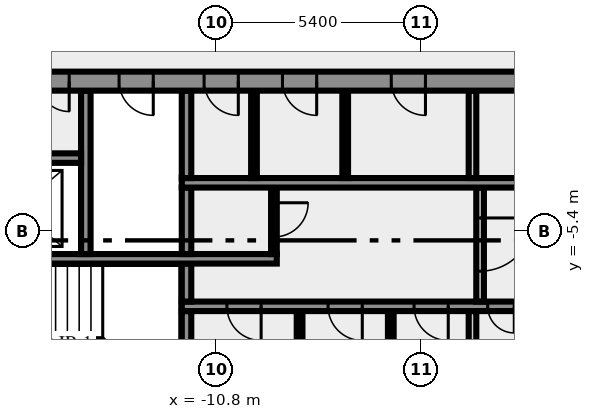
"""IFC4 building model, lengths in metres.
Left out: names, types, materials, properties, quantities, classifications, styles, units other than length and angle.
Written with IfcOpenShell. Run it as: python <this file> out.ifc"""

import sys

from ifc_helpers import new_model, si_unit, direction, frame, frame_2d, origin, place, context, subcontext, project, spatial, rectangle, extrude, element, fill, save


model = new_model("IFC4")
c1 = context("Model", 3, precision=1e-05, world=origin(), true_north=direction((0.0, 1.0)))
c2 = subcontext(c1, "Body", "Model", "MODEL_VIEW")
j1 = project(units=[si_unit("LENGTHUNIT", "METRE"), si_unit("PLANEANGLEUNIT", "RADIAN")], contexts=[c1])
p1 = place(None, origin())
s1 = spatial("IfcSite", under=j1, at=p1, CompositionType="ELEMENT")
p2 = place(p1, origin())
s2 = spatial("IfcBuilding", under=s1, at=p2, CompositionType="ELEMENT")
p3 = place(p2, frame((0.0, 0.0, 214.0)))
s3 = spatial("IfcBuildingStorey", under=s2, at=p3, CompositionType="ELEMENT", Elevation=214.0)
p4 = place(p3, frame((-11.575, -10.5, 0.0), z_axis=(0.0, 0.0, 1.0), x_axis=(0.0, 1.0, 0.0)))
e1 = element("IfcWall", 1, at=p4, inside=s3, PredefinedType="SHEAR", context=c2, shape_type="SweptSolid", body=[
    extrude(rectangle(XDim=3.0, YDim=0.25, at=frame_2d((1.5, 0.0))), origin(), (0.0, 0.0, 1.0), 3.65),
])
for number, where, z_axis, x_axis in (
    (2, (-8.6, -10.5, 0.0), (0.0, 0.0, 1.0), (0.0, 1.0, 0.0)),
    (3, (-6.2, -10.5, 0.0), (0.0, 0.0, 1.0), (0.0, 1.0, 0.0)),
):
    element("IfcWall", number, at=place(p3, frame(where, z_axis=z_axis, x_axis=x_axis)), inside=s3, PredefinedType="PARTITIONING", context=c2, shape_type="SweptSolid", body=[
        extrude(rectangle(XDim=3.0, YDim=0.15, at=frame_2d((1.5, 0.0))), origin(), (0.0, 0.0, 1.0), 3.65),
    ])
p5 = place(p3, frame((-4.05, -10.5, 0.0), z_axis=(0.0, 0.0, 1.0), x_axis=(0.0, 1.0, 0.0)))
e4 = element("IfcWall", 4, at=p5, inside=s3, PredefinedType="SOLIDWALL", context=c2, shape_type="SweptSolid", body=[
    extrude(rectangle(XDim=3.0, YDim=0.2, at=frame_2d((1.5, 0.0))), origin(), (0.0, 0.0, 1.0), 3.65),
])
p6 = place(p3, frame((11.7, -7.375, 0.0), z_axis=(0.0, 0.0, 1.0), x_axis=(-1.0, 0.0, 0.0)))
e5 = element("IfcWall", 5, at=p6, inside=s3, PredefinedType="SHEAR", context=c2, shape_type="SweptSolid", body=[
    extrude(rectangle(XDim=23.4, YDim=0.25, at=frame_2d((11.7, 0.0))), origin(), (0.0, 0.0, 1.0), 3.65),
])
p7 = place(p6, frame((21.312, 0.0, 0.0)))
e6 = element("IfcOpeningElement", 6, at=p7, cuts=e5, PredefinedType="OPENING", context=c2, shape_type="SweptSolid", body=[
    extrude(rectangle(XDim=0.9, YDim=2.1, at=frame_2d((0.45, 1.05))), frame((0.0, 0.135, 0.0), z_axis=(0.0, -1.0, 0.0), x_axis=(1.0, 0.0, 0.0)), (0.0, 0.0, 1.0), 0.27),
])
p8 = place(p6, frame((18.65, 0.0, 0.0)))
e7 = element("IfcOpeningElement", 7, at=p8, cuts=e5, PredefinedType="OPENING", context=c2, shape_type="SweptSolid", body=[
    extrude(rectangle(XDim=0.9, YDim=2.1, at=frame_2d((0.45, 1.05))), frame((0.0, 0.135, 0.0), z_axis=(0.0, -1.0, 0.0), x_axis=(1.0, 0.0, 0.0)), (0.0, 0.0, 1.0), 0.27),
])
p9 = place(p6, frame((16.388, 0.0, 0.0)))
e8 = element("IfcOpeningElement", 8, at=p9, cuts=e5, PredefinedType="OPENING", context=c2, shape_type="SweptSolid", body=[
    extrude(rectangle(XDim=0.9, YDim=2.1, at=frame_2d((0.45, 1.05))), frame((0.0, 0.135, 0.0), z_axis=(0.0, -1.0, 0.0), x_axis=(1.0, 0.0, 0.0)), (0.0, 0.0, 1.0), 0.27),
])
p10 = place(p6, frame((14.65, 0.0, 0.0)))
e9 = element("IfcOpeningElement", 9, at=p10, cuts=e5, PredefinedType="OPENING", context=c2, shape_type="SweptSolid", body=[
    extrude(rectangle(XDim=0.7, YDim=2.1, at=frame_2d((0.35, 1.05))), frame((0.0, 0.135, 0.0), z_axis=(0.0, -1.0, 0.0), x_axis=(1.0, 0.0, 0.0)), (0.0, 0.0, 1.0), 0.27),
])
p11 = place(p6, frame((13.35, 0.0, 0.0)))
e10 = element("IfcOpeningElement", 10, at=p11, cuts=e5, PredefinedType="OPENING", context=c2, shape_type="SweptSolid", body=[
    extrude(rectangle(XDim=0.9, YDim=2.1, at=frame_2d((0.45, 1.05))), frame((0.0, 0.135, 0.0), z_axis=(0.0, -1.0, 0.0), x_axis=(1.0, 0.0, 0.0)), (0.0, 0.0, 1.0), 0.27),
])
p12 = place(p6, frame((11.975, 0.0, 0.0)))
e11 = element("IfcOpeningElement", 11, at=p12, cuts=e5, PredefinedType="OPENING", context=c2, shape_type="SweptSolid", body=[
    extrude(rectangle(XDim=0.9, YDim=2.1, at=frame_2d((0.45, 1.05))), frame((0.0, 0.135, 0.0), z_axis=(0.0, -1.0, 0.0), x_axis=(1.0, 0.0, 0.0)), (0.0, 0.0, 1.0), 0.27),
])
p13 = place(p6, frame((10.5, 0.0, 0.0)))
e12 = element("IfcOpeningElement", 12, at=p13, cuts=e5, PredefinedType="OPENING", context=c2, shape_type="SweptSolid", body=[
    extrude(rectangle(XDim=0.9, YDim=2.1, at=frame_2d((0.45, 1.05))), frame((0.0, 0.135, 0.0), z_axis=(0.0, -1.0, 0.0), x_axis=(1.0, 0.0, 0.0)), (0.0, 0.0, 1.0), 0.27),
])
p14 = place(p6, frame((8.35, 0.0, 0.0)))
e13 = element("IfcOpeningElement", 13, at=p14, cuts=e5, PredefinedType="OPENING", context=c2, shape_type="SweptSolid", body=[
    extrude(rectangle(XDim=1.1, YDim=2.1, at=frame_2d((0.55, 1.05))), frame((0.0, 0.135, 0.0), z_axis=(0.0, -1.0, 0.0), x_axis=(1.0, 0.0, 0.0)), (0.0, 0.0, 1.0), 0.27),
])
p15 = place(p6, frame((5.85, 0.0, 0.0)))
e14 = element("IfcOpeningElement", 14, at=p15, cuts=e5, PredefinedType="OPENING", context=c2, shape_type="SweptSolid", body=[
    extrude(rectangle(XDim=1.1, YDim=2.1, at=frame_2d((0.55, 1.05))), frame((0.0, 0.135, 0.0), z_axis=(0.0, -1.0, 0.0), x_axis=(1.0, 0.0, 0.0)), (0.0, 0.0, 1.0), 0.27),
])
p16 = place(p6, frame((3.35, 0.0, 0.0)))
e15 = element("IfcOpeningElement", 15, at=p16, cuts=e5, PredefinedType="OPENING", context=c2, shape_type="SweptSolid", body=[
    extrude(rectangle(XDim=1.1, YDim=2.1, at=frame_2d((0.55, 1.05))), frame((0.0, 0.135, 0.0), z_axis=(0.0, -1.0, 0.0), x_axis=(1.0, 0.0, 0.0)), (0.0, 0.0, 1.0), 0.27),
])
p17 = place(p6, frame((0.85, 0.0, 0.0)))
e16 = element("IfcOpeningElement", 16, at=p17, cuts=e5, PredefinedType="OPENING", context=c2, shape_type="SweptSolid", body=[
    extrude(rectangle(XDim=1.1, YDim=2.1, at=frame_2d((0.55, 1.05))), frame((0.0, 0.135, 0.0), z_axis=(0.0, -1.0, 0.0), x_axis=(1.0, 0.0, 0.0)), (0.0, 0.0, 1.0), 0.27),
])
p18 = place(p3, frame((-11.575, -7.25, 0.0), z_axis=(0.0, 0.0, 1.0), x_axis=(0.0, 1.0, 0.0)))
e17 = element("IfcWall", 17, at=p18, inside=s3, PredefinedType="SHEAR", context=c2, shape_type="SweptSolid", body=[
    extrude(rectangle(XDim=1.0, YDim=0.25, at=frame_2d((0.5, 0.0))), origin(), (0.0, 0.0, 1.0), 3.65),
])
p19 = place(p3, frame((-3.85, -4.25, 0.0), z_axis=(0.0, 0.0, 1.0), x_axis=(0.0, -1.0, 0.0)))
e18 = element("IfcWall", 18, at=p19, inside=s3, PredefinedType="SOLIDWALL", context=c2, shape_type="SweptSolid", body=[
    extrude(rectangle(XDim=3.0, YDim=0.2, at=frame_2d((1.5, 0.0))), origin(), (0.0, 0.0, 1.0), 3.65),
])
p20 = place(p19, frame((0.8, 0.0, 0.0)))
e19 = element("IfcOpeningElement", 19, at=p20, cuts=e18, PredefinedType="OPENING", context=c2, shape_type="SweptSolid", body=[
    extrude(rectangle(XDim=1.4, YDim=2.1, at=frame_2d((0.7, 1.05))), frame((0.0, 0.11, 0.0), z_axis=(0.0, -1.0, 0.0), x_axis=(1.0, 0.0, 0.0)), (0.0, 0.0, 1.0), 0.22),
])
p21 = place(p3, frame((-9.2, -6.125, 0.0), z_axis=(0.0, 0.0, 1.0), x_axis=(-1.0, 0.0, 0.0)))
e20 = element("IfcWall", 20, at=p21, inside=s3, PredefinedType="SHEAR", context=c2, shape_type="SweptSolid", body=[
    extrude(rectangle(XDim=10.8, YDim=0.25, at=frame_2d((5.4, 0.0))), origin(), (0.0, 0.0, 1.0), 3.65),
])
p22 = place(p21, frame((8.45, 0.0, 0.0)))
e21 = element("IfcOpeningElement", 21, at=p22, cuts=e20, PredefinedType="OPENING", context=c2, shape_type="SweptSolid", body=[
    extrude(rectangle(XDim=1.8, YDim=2.1, at=frame_2d((0.9, 1.05))), frame((0.0, 0.135, 0.0), z_axis=(0.0, -1.0, 0.0), x_axis=(1.0, 0.0, 0.0)), (0.0, 0.0, 1.0), 0.27),
])
p23 = place(p3, frame((-14.225, -6.0, 0.0), z_axis=(0.0, 0.0, 1.0), x_axis=(0.0, 1.0, 0.0)))
e22 = element("IfcWall", 22, at=p23, inside=s3, PredefinedType="SHEAR", context=c2, shape_type="SweptSolid", body=[
    extrude(rectangle(XDim=4.3, YDim=0.25, at=frame_2d((2.15, 0.0))), origin(), (0.0, 0.0, 1.0), 3.65),
])
p24 = place(p3, frame((-11.575, -6.0, 0.0), z_axis=(0.0, 0.0, 1.0), x_axis=(0.0, 1.0, 0.0)))
e23 = element("IfcWall", 23, at=p24, inside=s3, PredefinedType="SHEAR", context=c2, shape_type="SweptSolid", body=[
    extrude(rectangle(XDim=1.75, YDim=0.25, at=frame_2d((0.875, 0.0))), origin(), (0.0, 0.0, 1.0), 3.65),
])
p25 = place(p3, frame((-9.275, -4.25, 0.0), z_axis=(0.0, 0.0, 1.0), x_axis=(0.0, -1.0, 0.0)))
e24 = element("IfcWall", 24, at=p25, inside=s3, PredefinedType="PARTITIONING", context=c2, shape_type="SweptSolid", body=[
    extrude(rectangle(XDim=1.75, YDim=0.15, at=frame_2d((0.875, 0.0))), origin(), (0.0, 0.0, 1.0), 3.65),
])
p26 = place(p25, frame((0.4, 0.0, 0.0)))
e25 = element("IfcOpeningElement", 25, at=p26, cuts=e24, PredefinedType="OPENING", context=c2, shape_type="SweptSolid", body=[
    extrude(rectangle(XDim=0.9, YDim=2.1, at=frame_2d((0.45, 1.05))), frame((0.0, 0.085, 0.0), z_axis=(0.0, -1.0, 0.0), x_axis=(1.0, 0.0, 0.0)), (0.0, 0.0, 1.0), 0.17),
])
p27 = place(p3, frame((-11.7, -4.125, 0.0), z_axis=(0.0, 0.0, 1.0), x_axis=(1.0, 0.0, 0.0)))
e26 = element("IfcWall", 26, at=p27, inside=s3, PredefinedType="SHEAR", context=c2, shape_type="SweptSolid", body=[
    extrude(rectangle(XDim=10.05, YDim=0.25, at=frame_2d((5.025, 0.0))), origin(), (0.0, 0.0, 1.0), 3.65),
])
p28 = place(p3, frame((-11.575, -4.0, 0.0), z_axis=(0.0, 0.0, 1.0), x_axis=(0.0, 1.0, 0.0)))
e27 = element("IfcWall", 27, at=p28, inside=s3, PredefinedType="SHEAR", context=c2, shape_type="SweptSolid", body=[
    extrude(rectangle(XDim=2.3, YDim=0.25, at=frame_2d((1.15, 0.0))), origin(), (0.0, 0.0, 1.0), 3.65),
])
for number, where, z_axis, x_axis in (
    (28, (-9.8, -4.0, 0.0), (0.0, 0.0, 1.0), (0.0, 1.0, 0.0)),
    (29, (-7.4, -4.0, 0.0), (0.0, 0.0, 1.0), (0.0, 1.0, 0.0)),
):
    element("IfcWall", number, at=place(p3, frame(where, z_axis=z_axis, x_axis=x_axis)), inside=s3, PredefinedType="PARTITIONING", context=c2, shape_type="SweptSolid", body=[
        extrude(rectangle(XDim=2.3, YDim=0.15, at=frame_2d((1.15, 0.0))), origin(), (0.0, 0.0, 1.0), 3.65),
    ])
p29 = place(p3, frame((-4.05, -4.0, 0.0), z_axis=(0.0, 0.0, 1.0), x_axis=(0.0, 1.0, 0.0)))
e30 = element("IfcWall", 30, at=p29, inside=s3, PredefinedType="SOLIDWALL", context=c2, shape_type="SweptSolid", body=[
    extrude(rectangle(XDim=2.3, YDim=0.2, at=frame_2d((1.15, 0.0))), origin(), (0.0, 0.0, 1.0), 3.65),
])
p30 = place(p3, frame((-17.35, -3.475, 0.0), z_axis=(0.0, 0.0, 1.0), x_axis=(1.0, 0.0, 0.0)))
e31 = element("IfcWall", 31, at=p30, inside=s3, PredefinedType="SHEAR", context=c2, shape_type="SweptSolid", body=[
    extrude(rectangle(XDim=3.0, YDim=0.25, at=frame_2d((1.5, 0.0))), origin(), (0.0, 0.0, 1.0), 3.65),
])
p31 = place(p3, frame((20.49, -1.45, 0.0), z_axis=(0.0, 0.0, 1.0), x_axis=(-1.0, 0.0, 0.0)))
e32 = element("IfcWall", 32, at=p31, inside=s3, PredefinedType="SHEAR", context=c2, shape_type="SweptSolid", body=[
    extrude(rectangle(XDim=40.98, YDim=0.5, at=frame_2d((20.49, 0.0))), origin(), (0.0, 0.0, 1.0), 3.65),
])
p32 = place(p31, frame((38.14, 0.0, 0.0)))
e33 = element("IfcOpeningElement", 33, at=p32, cuts=e32, PredefinedType="OPENING", context=c2, shape_type="SweptSolid", body=[
    extrude(rectangle(XDim=1.8, YDim=2.1, at=frame_2d((0.9, 1.05))), frame((0.0, 0.26, 0.0), z_axis=(0.0, -1.0, 0.0), x_axis=(1.0, 0.0, 0.0)), (0.0, 0.0, 1.0), 0.52),
])
p33 = place(p31, frame((36.728, 0.0, 0.0)))
e34 = element("IfcOpeningElement", 34, at=p33, cuts=e32, PredefinedType="OPENING", context=c2, shape_type="SweptSolid", body=[
    extrude(rectangle(XDim=0.8, YDim=2.1, at=frame_2d((0.4, 1.05))), frame((0.0, 0.26, 0.0), z_axis=(0.0, -1.0, 0.0), x_axis=(1.0, 0.0, 0.0)), (0.0, 0.0, 1.0), 0.52),
])
p34 = place(p31, frame((35.153, 0.0, 0.0)))
e35 = element("IfcOpeningElement", 35, at=p34, cuts=e32, PredefinedType="OPENING", context=c2, shape_type="SweptSolid", body=[
    extrude(rectangle(XDim=0.8, YDim=2.1, at=frame_2d((0.4, 1.05))), frame((0.0, 0.26, 0.0), z_axis=(0.0, -1.0, 0.0), x_axis=(1.0, 0.0, 0.0)), (0.0, 0.0, 1.0), 0.52),
])
p35 = place(p31, frame((32.94, 0.0, 0.0)))
e36 = element("IfcOpeningElement", 36, at=p35, cuts=e32, PredefinedType="OPENING", context=c2, shape_type="SweptSolid", body=[
    extrude(rectangle(XDim=0.9, YDim=2.1, at=frame_2d((0.45, 1.05))), frame((0.0, 0.26, 0.0), z_axis=(0.0, -1.0, 0.0), x_axis=(1.0, 0.0, 0.0)), (0.0, 0.0, 1.0), 0.52),
])
p36 = place(p31, frame((30.702, 0.0, 0.0)))
e37 = element("IfcOpeningElement", 37, at=p36, cuts=e32, PredefinedType="OPENING", context=c2, shape_type="SweptSolid", body=[
    extrude(rectangle(XDim=0.9, YDim=2.1, at=frame_2d((0.45, 1.05))), frame((0.0, 0.26, 0.0), z_axis=(0.0, -1.0, 0.0), x_axis=(1.0, 0.0, 0.0)), (0.0, 0.0, 1.0), 0.52),
])
p37 = place(p31, frame((28.64, 0.0, 0.0)))
e38 = element("IfcOpeningElement", 38, at=p37, cuts=e32, PredefinedType="OPENING", context=c2, shape_type="SweptSolid", body=[
    extrude(rectangle(XDim=0.9, YDim=2.1, at=frame_2d((0.45, 1.05))), frame((0.0, 0.26, 0.0), z_axis=(0.0, -1.0, 0.0), x_axis=(1.0, 0.0, 0.0)), (0.0, 0.0, 1.0), 0.52),
])
p38 = place(p31, frame((25.778, 0.0, 0.0)))
e39 = element("IfcOpeningElement", 39, at=p38, cuts=e32, PredefinedType="OPENING", context=c2, shape_type="SweptSolid", body=[
    extrude(rectangle(XDim=0.9, YDim=2.1, at=frame_2d((0.45, 1.05))), frame((0.0, 0.26, 0.0), z_axis=(0.0, -1.0, 0.0), x_axis=(1.0, 0.0, 0.0)), (0.0, 0.0, 1.0), 0.52),
])
p39 = place(p31, frame((19.59, 0.0, 0.0)))
e40 = element("IfcOpeningElement", 40, at=p39, cuts=e32, PredefinedType="OPENING", context=c2, shape_type="SweptSolid", body=[
    extrude(rectangle(XDim=2.0, YDim=2.1, at=frame_2d((1.0, 1.05))), frame((0.0, 0.26, 0.0), z_axis=(0.0, -1.0, 0.0), x_axis=(1.0, 0.0, 0.0)), (0.0, 0.0, 1.0), 0.52),
])
p40 = place(p31, frame((7.14, 0.0, 0.0)))
e41 = element("IfcOpeningElement", 41, at=p40, cuts=e32, PredefinedType="OPENING", context=c2, shape_type="SweptSolid", body=[
    extrude(rectangle(XDim=0.9, YDim=2.1, at=frame_2d((0.45, 1.05))), frame((0.0, 0.26, 0.0), z_axis=(0.0, -1.0, 0.0), x_axis=(1.0, 0.0, 0.0)), (0.0, 0.0, 1.0), 0.52),
])
p41 = place(p31, frame((4.19, 0.0, 0.0)))
e42 = element("IfcOpeningElement", 42, at=p41, cuts=e32, PredefinedType="OPENING", context=c2, shape_type="SweptSolid", body=[
    extrude(rectangle(XDim=0.9, YDim=2.1, at=frame_2d((0.45, 1.05))), frame((0.0, 0.26, 0.0), z_axis=(0.0, -1.0, 0.0), x_axis=(1.0, 0.0, 0.0)), (0.0, 0.0, 1.0), 0.52),
])
p42 = place(p31, frame((1.04, 0.0, 0.0)))
e43 = element("IfcOpeningElement", 43, at=p42, cuts=e32, PredefinedType="OPENING", context=c2, shape_type="SweptSolid", body=[
    extrude(rectangle(XDim=1.8, YDim=2.1, at=frame_2d((0.9, 1.05))), frame((0.0, 0.26, 0.0), z_axis=(0.0, -1.0, 0.0), x_axis=(1.0, 0.0, 0.0)), (0.0, 0.0, 1.0), 0.52),
])
p43 = place(p7, origin())
e44 = element("IfcDoor", 44, at=p43, inside=s3, OperationType="SINGLE_SWING_RIGHT", PredefinedType="DOOR", context=c2, shape_type="SweptSolid", body=[
    extrude(rectangle(XDim=0.9, YDim=2.1, at=frame_2d((0.45, 1.05))), frame((0.0, 0.025, 0.0), z_axis=(0.0, -1.0, 0.0), x_axis=(1.0, 0.0, 0.0)), (0.0, 0.0, 1.0), 0.05),
])
fill(e6, e44)
p44 = place(p8, origin())
e45 = element("IfcDoor", 45, at=p44, inside=s3, OperationType="SINGLE_SWING_RIGHT", PredefinedType="DOOR", context=c2, shape_type="SweptSolid", body=[
    extrude(rectangle(XDim=0.9, YDim=2.1, at=frame_2d((0.45, 1.05))), frame((0.0, 0.025, 0.0), z_axis=(0.0, -1.0, 0.0), x_axis=(1.0, 0.0, 0.0)), (0.0, 0.0, 1.0), 0.05),
])
fill(e7, e45)
p45 = place(p9, origin())
e46 = element("IfcDoor", 46, at=p45, inside=s3, OperationType="SINGLE_SWING_RIGHT", PredefinedType="DOOR", context=c2, shape_type="SweptSolid", body=[
    extrude(rectangle(XDim=0.9, YDim=2.1, at=frame_2d((0.45, 1.05))), frame((0.0, 0.025, 0.0), z_axis=(0.0, -1.0, 0.0), x_axis=(1.0, 0.0, 0.0)), (0.0, 0.0, 1.0), 0.05),
])
fill(e8, e46)
p46 = place(p10, origin())
e47 = element("IfcDoor", 47, at=p46, inside=s3, OperationType="SINGLE_SWING_RIGHT", PredefinedType="DOOR", context=c2, shape_type="SweptSolid", body=[
    extrude(rectangle(XDim=0.7, YDim=2.1, at=frame_2d((0.35, 1.05))), frame((0.0, 0.025, 0.0), z_axis=(0.0, -1.0, 0.0), x_axis=(1.0, 0.0, 0.0)), (0.0, 0.0, 1.0), 0.05),
])
fill(e9, e47)
p47 = place(p20, origin())
e48 = element("IfcDoor", 48, at=p47, inside=s3, OperationType="DOUBLE_DOOR_SINGLE_SWING", PredefinedType="DOOR", context=c2, shape_type="SweptSolid", body=[
    extrude(rectangle(XDim=1.4, YDim=2.1, at=frame_2d((0.7, 1.05))), frame((0.0, 0.025, 0.0), z_axis=(0.0, -1.0, 0.0), x_axis=(1.0, 0.0, 0.0)), (0.0, 0.0, 1.0), 0.05),
])
fill(e19, e48)
p48 = place(p26, origin())
e49 = element("IfcDoor", 49, at=p48, inside=s3, OperationType="SINGLE_SWING_LEFT", PredefinedType="DOOR", context=c2, shape_type="SweptSolid", body=[
    extrude(rectangle(XDim=0.9, YDim=2.1, at=frame_2d((0.45, 1.05))), frame((0.0, 0.025, 0.0), z_axis=(0.0, -1.0, 0.0), x_axis=(1.0, 0.0, 0.0)), (0.0, 0.0, 1.0), 0.05),
])
fill(e25, e49)
p49 = place(p34, origin())
e50 = element("IfcDoor", 50, at=p49, inside=s3, OperationType="SINGLE_SWING_RIGHT", PredefinedType="DOOR", context=c2, shape_type="SweptSolid", body=[
    extrude(rectangle(XDim=0.8, YDim=2.1, at=frame_2d((0.4, 1.05))), frame((0.0, 0.025, 0.0), z_axis=(0.0, -1.0, 0.0), x_axis=(1.0, 0.0, 0.0)), (0.0, 0.0, 1.0), 0.05),
])
fill(e35, e50)
p50 = place(p35, origin())
e51 = element("IfcDoor", 51, at=p50, inside=s3, OperationType="SINGLE_SWING_RIGHT", PredefinedType="DOOR", context=c2, shape_type="SweptSolid", body=[
    extrude(rectangle(XDim=0.9, YDim=2.1, at=frame_2d((0.45, 1.05))), frame((0.0, 0.025, 0.0), z_axis=(0.0, -1.0, 0.0), x_axis=(1.0, 0.0, 0.0)), (0.0, 0.0, 1.0), 0.05),
])
fill(e36, e51)
p51 = place(p36, origin())
e52 = element("IfcDoor", 52, at=p51, inside=s3, OperationType="SINGLE_SWING_RIGHT", PredefinedType="DOOR", context=c2, shape_type="SweptSolid", body=[
    extrude(rectangle(XDim=0.9, YDim=2.1, at=frame_2d((0.45, 1.05))), frame((0.0, 0.025, 0.0), z_axis=(0.0, -1.0, 0.0), x_axis=(1.0, 0.0, 0.0)), (0.0, 0.0, 1.0), 0.05),
])
fill(e37, e52)
p52 = place(p37, origin())
e53 = element("IfcDoor", 53, at=p52, inside=s3, OperationType="SINGLE_SWING_RIGHT", PredefinedType="DOOR", context=c2, shape_type="SweptSolid", body=[
    extrude(rectangle(XDim=0.9, YDim=2.1, at=frame_2d((0.45, 1.05))), frame((0.0, 0.025, 0.0), z_axis=(0.0, -1.0, 0.0), x_axis=(1.0, 0.0, 0.0)), (0.0, 0.0, 1.0), 0.05),
])
fill(e38, e53)
p53 = place(p38, origin())
e54 = element("IfcDoor", 54, at=p53, inside=s3, OperationType="SINGLE_SWING_RIGHT", PredefinedType="DOOR", context=c2, shape_type="SweptSolid", body=[
    extrude(rectangle(XDim=0.9, YDim=2.1, at=frame_2d((0.45, 1.05))), frame((0.0, 0.025, 0.0), z_axis=(0.0, -1.0, 0.0), x_axis=(1.0, 0.0, 0.0)), (0.0, 0.0, 1.0), 0.05),
])
fill(e39, e54)
save(model, sys.argv[1])
